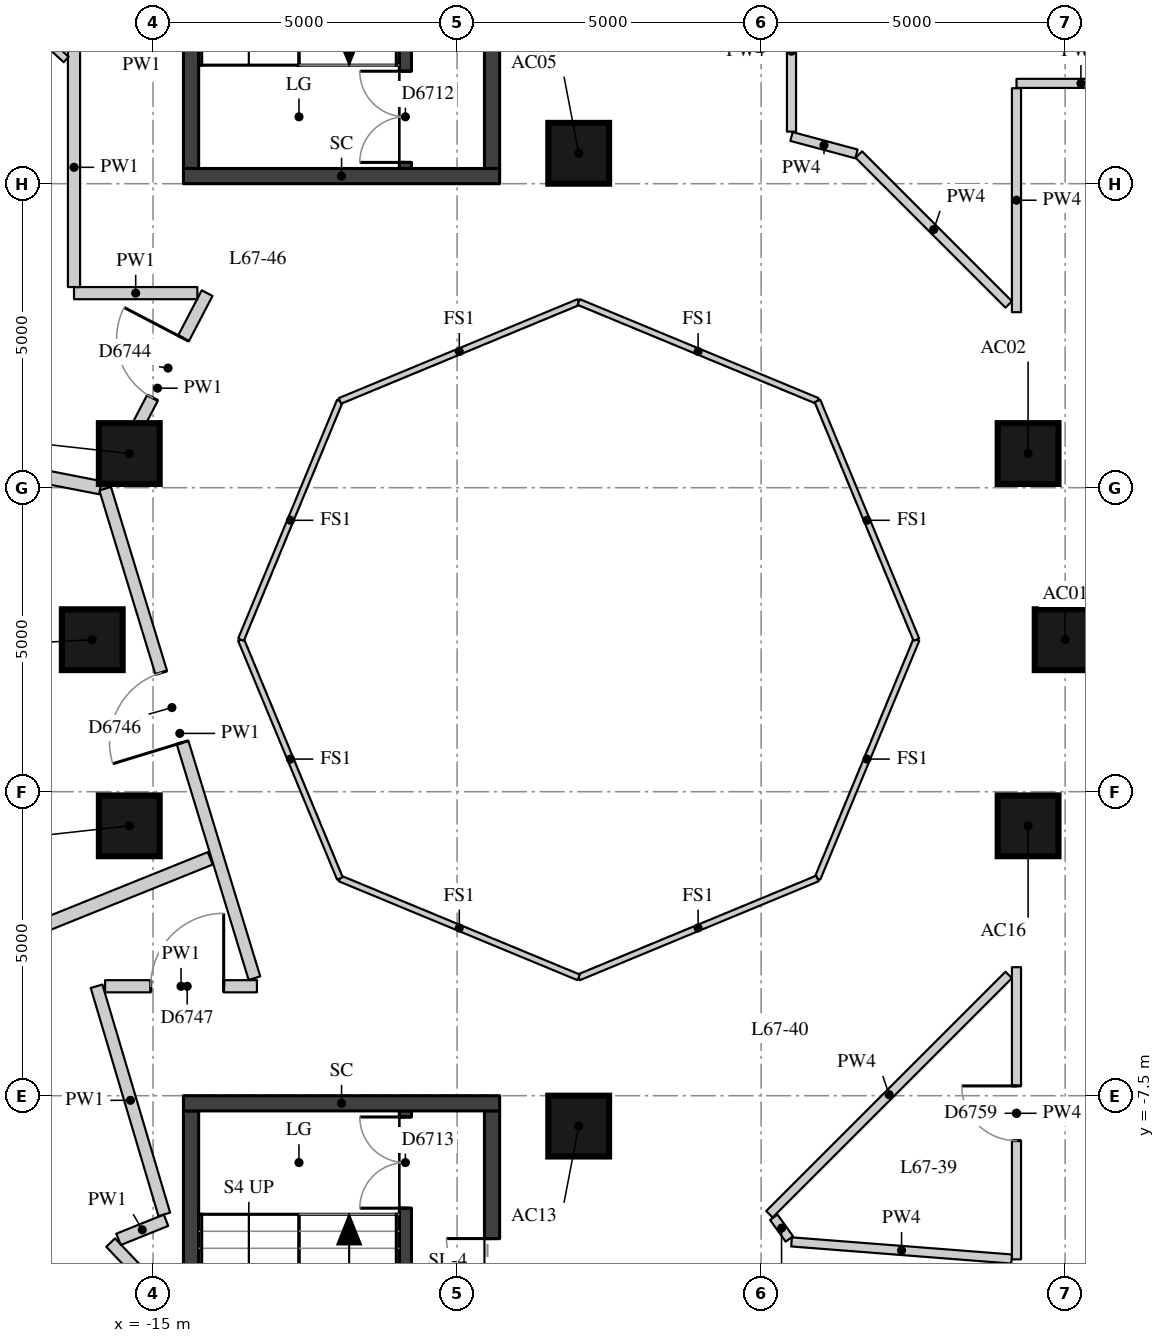
"""IFC4 building model, lengths in metres.
Left out: names, types, materials, properties, quantities, classifications, styles, units other than length and angle.
Written with IfcOpenShell. Run it as: python <this file> out.ifc"""

import sys

from ifc_helpers import new_model, si_unit, direction, frame, frame_2d, origin, origin_2d, place, context, subcontext, project, spatial, rectangle, extrude, element, fill, save


model = new_model("IFC4")
c1 = context("Model", 3, precision=1e-05, world=origin(), true_north=direction((0.0, 1.0)))
c2 = subcontext(c1, "Body", "Model", "MODEL_VIEW")
j1 = project(units=[si_unit("LENGTHUNIT", "METRE"), si_unit("PLANEANGLEUNIT", "RADIAN")], contexts=[c1])
p1 = place(None, origin())
s1 = spatial("IfcSite", under=j1, at=p1, CompositionType="ELEMENT")
p2 = place(p1, origin())
s2 = spatial("IfcBuilding", under=s1, at=p2, CompositionType="ELEMENT")
p3 = place(p2, frame((0.0, 0.0, 236.6)))
s3 = spatial("IfcBuildingStorey", under=s2, at=p3, CompositionType="ELEMENT", Elevation=236.6)
for number, where, z_axis, x_axis in (
    (1, (0.0, 0.0, 0.0), (0.0, 0.0, 1.0), (1.0, 0.0, 0.0)),
    (2, (-0.609, 3.062, 0.0), (0.0, 0.0, 1.0), (1.0, 0.0, 0.0)),
    (3, (-8.0, 8.0, 0.0), (0.0, 0.0, 1.0), (1.0, 0.0, 0.0)),
    (4, (-15.391, 3.062, 0.0), (0.0, 0.0, 1.0), (1.0, 0.0, 0.0)),
    (5, (-16.0, 0.0, 0.0), (0.0, 0.0, 1.0), (1.0, 0.0, 0.0)),
    (6, (-15.391, -3.062, 0.0), (0.0, 0.0, 1.0), (1.0, 0.0, 0.0)),
    (7, (-8.0, -8.0, 0.0), (0.0, 0.0, 1.0), (1.0, 0.0, 0.0)),
    (8, (-0.609, -3.062, 0.0), (0.0, 0.0, 1.0), (1.0, 0.0, 0.0)),
):
    element("IfcColumn", number, at=place(p3, frame(where, z_axis=z_axis, x_axis=x_axis)), inside=s3, PredefinedType="COLUMN", context=c2, shape_type="SweptSolid", body=[
        extrude(rectangle(XDim=1.0, YDim=1.0, at=origin_2d()), origin(), (0.0, 0.0, 1.0), 3.3),
    ])
p4 = place(p3, frame((-10.85, 7.75, 0.0), z_axis=(0.0, 0.0, 1.0), x_axis=(0.0, 1.0, 0.0)))
e9 = element("IfcWall", 9, at=p4, inside=s3, PredefinedType="SHEAR", context=c2, shape_type="SweptSolid", body=[
    extrude(rectangle(XDim=6.0, YDim=0.2, at=frame_2d((3.0, 0.0))), origin(), (0.0, 0.0, 1.0), 3.02),
])
p5 = place(p4, frame((0.1, 0.0, 0.0)))
e10 = element("IfcOpeningElement", 10, at=p5, cuts=e9, PredefinedType="OPENING", context=c2, shape_type="SweptSolid", body=[
    extrude(rectangle(XDim=1.5, YDim=2.1, at=frame_2d((0.75, 1.05))), frame((0.0, 0.11, 0.0), z_axis=(0.0, -1.0, 0.0), x_axis=(1.0, 0.0, 0.0)), (0.0, 0.0, 1.0), 0.22),
])
p6 = place(p3, frame((-10.85, -13.75, 0.0), z_axis=(0.0, 0.0, 1.0), x_axis=(0.0, 1.0, 0.0)))
e11 = element("IfcWall", 11, at=p6, inside=s3, PredefinedType="SHEAR", context=c2, shape_type="SweptSolid", body=[
    extrude(rectangle(XDim=6.0, YDim=0.2, at=frame_2d((3.0, 0.0))), origin(), (0.0, 0.0, 1.0), 3.02),
])
p7 = place(p6, frame((4.4, 0.0, 0.0)))
e12 = element("IfcOpeningElement", 12, at=p7, cuts=e11, PredefinedType="OPENING", context=c2, shape_type="SweptSolid", body=[
    extrude(rectangle(XDim=1.5, YDim=2.1, at=frame_2d((0.75, 1.05))), frame((0.0, 0.11, 0.0), z_axis=(0.0, -1.0, 0.0), x_axis=(1.0, 0.0, 0.0)), (0.0, 0.0, 1.0), 0.22),
])
p8 = place(p3, frame((-14.375, 7.75, -0.28), z_axis=(0.0, 0.0, 1.0), x_axis=(0.0, 1.0, 0.0)))
e13 = element("IfcWall", 13, at=p8, inside=s3, PredefinedType="SHEAR", context=c2, shape_type="SweptSolid", body=[
    extrude(rectangle(XDim=6.0, YDim=0.25, at=frame_2d((3.0, 0.0))), origin(), (0.0, 0.0, 1.0), 3.3),
])
p9 = place(p3, frame((-9.425, 7.75, -0.28), z_axis=(0.0, 0.0, 1.0), x_axis=(0.0, 1.0, 0.0)))
e14 = element("IfcWall", 14, at=p9, inside=s3, PredefinedType="SHEAR", context=c2, shape_type="SweptSolid", body=[
    extrude(rectangle(XDim=6.0, YDim=0.25, at=frame_2d((3.0, 0.0))), origin(), (0.0, 0.0, 1.0), 3.3),
])
p10 = place(p9, frame((2.1, 0.0, 0.28)))
e15 = element("IfcOpeningElement", 15, at=p10, cuts=e14, PredefinedType="OPENING", context=c2, shape_type="SweptSolid", body=[
    extrude(rectangle(XDim=1.5, YDim=2.1, at=frame_2d((0.75, 1.05))), frame((0.0, 0.135, 0.0), z_axis=(0.0, -1.0, 0.0), x_axis=(1.0, 0.0, 0.0)), (0.0, 0.0, 1.0), 0.27),
])
p11 = place(p3, frame((-14.5, 7.625, -0.28), z_axis=(0.0, 0.0, 1.0), x_axis=(1.0, 0.0, 0.0)))
e16 = element("IfcWall", 16, at=p11, inside=s3, PredefinedType="SHEAR", context=c2, shape_type="SweptSolid", body=[
    extrude(rectangle(XDim=5.2, YDim=0.25, at=frame_2d((2.6, 0.0))), origin(), (0.0, 0.0, 1.0), 3.3),
])
p12 = place(p3, frame((-14.375, -13.75, -0.28), z_axis=(0.0, 0.0, 1.0), x_axis=(0.0, 1.0, 0.0)))
e17 = element("IfcWall", 17, at=p12, inside=s3, PredefinedType="SHEAR", context=c2, shape_type="SweptSolid", body=[
    extrude(rectangle(XDim=6.0, YDim=0.25, at=frame_2d((3.0, 0.0))), origin(), (0.0, 0.0, 1.0), 3.3),
])
p13 = place(p3, frame((-9.425, -13.75, -0.28), z_axis=(0.0, 0.0, 1.0), x_axis=(0.0, 1.0, 0.0)))
e18 = element("IfcWall", 18, at=p13, inside=s3, PredefinedType="SHEAR", context=c2, shape_type="SweptSolid", body=[
    extrude(rectangle(XDim=6.0, YDim=0.25, at=frame_2d((3.0, 0.0))), origin(), (0.0, 0.0, 1.0), 3.3),
])
p14 = place(p13, frame((2.4, 0.0, 0.28)))
e19 = element("IfcOpeningElement", 19, at=p14, cuts=e18, PredefinedType="OPENING", context=c2, shape_type="SweptSolid", body=[
    extrude(rectangle(XDim=1.5, YDim=2.1, at=frame_2d((0.75, 1.05))), frame((0.0, 0.135, 0.0), z_axis=(0.0, -1.0, 0.0), x_axis=(1.0, 0.0, 0.0)), (0.0, 0.0, 1.0), 0.27),
])
p15 = place(p3, frame((-14.5, -7.625, -0.28), z_axis=(0.0, 0.0, 1.0), x_axis=(1.0, 0.0, 0.0)))
e20 = element("IfcWall", 20, at=p15, inside=s3, PredefinedType="SHEAR", context=c2, shape_type="SweptSolid", body=[
    extrude(rectangle(XDim=5.2, YDim=0.25, at=frame_2d((2.6, 0.0))), origin(), (0.0, 0.0, 1.0), 3.3),
])
p16 = place(p3, frame((-14.563, -11.111, 0.0), z_axis=(0.0, 0.0, 1.0), x_axis=(-0.688574238414, 0.725165855645, 0.0)))
e21 = element("IfcWall", 21, at=p16, inside=s3, PredefinedType="PARTITIONING", context=c2, shape_type="SweptSolid", body=[
    extrude(rectangle(XDim=1.648, YDim=0.2, at=frame_2d((0.824, 0.0))), origin(), (0.0, 0.0, 1.0), 3.02),
])
p17 = place(p3, frame((-15.568, -9.863, 0.0), z_axis=(0.0, 0.0, 1.0), x_axis=(0.92779485846, 0.373090740457, 0.0)))
e22 = element("IfcWall", 22, at=p17, inside=s3, PredefinedType="PARTITIONING", context=c2, shape_type="SweptSolid", body=[
    extrude(rectangle(XDim=0.842, YDim=0.2, at=frame_2d((0.421, 0.0))), origin(), (0.0, 0.0, 1.0), 3.02),
])
p18 = place(p3, frame((-14.815, -9.452, 0.0), z_axis=(0.0, 0.0, 1.0), x_axis=(-0.284600079658, 0.958646334504, 0.0)))
e23 = element("IfcWall", 23, at=p18, inside=s3, PredefinedType="PARTITIONING", context=c2, shape_type="SweptSolid", body=[
    extrude(rectangle(XDim=3.914, YDim=0.2, at=frame_2d((1.957, 0.0))), origin(), (0.0, 0.0, 1.0), 3.02),
])
p19 = place(p3, frame((-15.789, -5.7, 0.0), z_axis=(0.0, 0.0, 1.0), x_axis=(1.0, 0.0, 0.0)))
e24 = element("IfcWall", 24, at=p19, inside=s3, PredefinedType="PARTITIONING", context=c2, shape_type="SweptSolid", body=[
    extrude(rectangle(XDim=2.497, YDim=0.2, at=frame_2d((1.249, 0.0))), origin(), (0.0, 0.0, 1.0), 3.02),
])
p20 = place(p19, frame((0.75, 0.0, 0.0)))
e25 = element("IfcOpeningElement", 25, at=p20, cuts=e24, PredefinedType="OPENING", context=c2, shape_type="SweptSolid", body=[
    extrude(rectangle(XDim=1.2, YDim=2.1, at=frame_2d((0.6, 1.05))), frame((0.0, 0.11, 0.0), z_axis=(0.0, -1.0, 0.0), x_axis=(1.0, 0.0, 0.0)), (0.0, 0.0, 1.0), 0.22),
])
p21 = place(p3, frame((-13.333, -5.567, 0.0), z_axis=(0.0, 0.0, 1.0), x_axis=(-0.291732883234, 0.956499830026, 0.0)))
e26 = element("IfcWall", 26, at=p21, inside=s3, PredefinedType="PARTITIONING", context=c2, shape_type="SweptSolid", body=[
    extrude(rectangle(XDim=8.417, YDim=0.2, at=frame_2d((4.208, 0.0))), origin(), (0.0, 0.0, 1.0), 3.02),
])
p22 = place(p21, frame((4.053, 0.0, 0.0)))
e27 = element("IfcOpeningElement", 27, at=p22, cuts=e26, PredefinedType="OPENING", context=c2, shape_type="SweptSolid", body=[
    extrude(rectangle(XDim=1.2, YDim=2.1, at=frame_2d((0.6, 1.05))), frame((0.0, 0.11, 0.0), z_axis=(0.0, -1.0, 0.0), x_axis=(1.0, 0.0, 0.0)), (0.0, 0.0, 1.0), 0.22),
])
p23 = place(p3, frame((-15.742, 2.573, 0.0), z_axis=(0.0, 0.0, 1.0), x_axis=(0.462435860297, 0.886652736482, 0.0)))
e28 = element("IfcWall", 28, at=p23, inside=s3, PredefinedType="PARTITIONING", context=c2, shape_type="SweptSolid", body=[
    extrude(rectangle(XDim=3.526, YDim=0.2, at=frame_2d((1.763, 0.0))), origin(), (0.0, 0.0, 1.0), 3.02),
])
p24 = place(p23, frame((1.586, 0.0, 0.0)))
e29 = element("IfcOpeningElement", 29, at=p24, cuts=e28, PredefinedType="OPENING", context=c2, shape_type="SweptSolid", body=[
    extrude(rectangle(XDim=1.1, YDim=2.1, at=frame_2d((0.55, 1.05))), frame((0.0, 0.11, 0.0), z_axis=(0.0, -1.0, 0.0), x_axis=(1.0, 0.0, 0.0)), (0.0, 0.0, 1.0), 0.22),
])
p25 = place(p3, frame((-14.271, 5.7, 0.0), z_axis=(0.0, 0.0, 1.0), x_axis=(-1.0, 0.0, 0.0)))
e30 = element("IfcWall", 30, at=p25, inside=s3, PredefinedType="PARTITIONING", context=c2, shape_type="SweptSolid", body=[
    extrude(rectangle(XDim=2.029, YDim=0.2, at=frame_2d((1.014, 0.0))), origin(), (0.0, 0.0, 1.0), 3.02),
])
p26 = place(p3, frame((-16.3, 5.8, 0.0), z_axis=(0.0, 0.0, 1.0), x_axis=(0.0, 1.0, 0.0)))
e31 = element("IfcWall", 31, at=p26, inside=s3, PredefinedType="PARTITIONING", context=c2, shape_type="SweptSolid", body=[
    extrude(rectangle(XDim=3.939, YDim=0.2, at=frame_2d((1.969, 0.0))), origin(), (0.0, 0.0, 1.0), 3.02),
])
p27 = place(p3, frame((1.32, 9.15, 0.0), z_axis=(0.0, 0.0, 1.0), x_axis=(-1.0, 0.0, 0.0)))
e32 = element("IfcWall", 32, at=p27, inside=s3, PredefinedType="PARTITIONING", context=c2, shape_type="SweptSolid", body=[
    extrude(rectangle(XDim=2.12, YDim=0.15, at=frame_2d((1.06, 0.0))), origin(), (0.0, 0.0, 1.0), 3.02),
])
p28 = place(p3, frame((-0.8, 9.07, 0.0), z_axis=(0.0, 0.0, 1.0), x_axis=(0.0, -1.0, 0.0)))
e33 = element("IfcWall", 33, at=p28, inside=s3, PredefinedType="PARTITIONING", context=c2, shape_type="SweptSolid", body=[
    extrude(rectangle(XDim=3.683, YDim=0.15, at=frame_2d((1.842, 0.0))), origin(), (0.0, 0.0, 1.0), 3.02),
])
p29 = place(p3, frame((-0.927, 5.514, 0.0), z_axis=(0.0, 0.0, 1.0), x_axis=(-0.707106781187, 0.707106781187, 0.0)))
e34 = element("IfcWall", 34, at=p29, inside=s3, PredefinedType="PARTITIONING", context=c2, shape_type="SweptSolid", body=[
    extrude(rectangle(XDim=3.487, YDim=0.15, at=frame_2d((1.743, 0.0))), origin(), (0.0, 0.0, 1.0), 3.02),
])
p30 = place(p3, frame((-3.432, 7.99, 0.0), z_axis=(0.0, 0.0, 1.0), x_axis=(-0.965900750832, 0.258912609855, 0.0)))
e35 = element("IfcWall", 35, at=p30, inside=s3, PredefinedType="PARTITIONING", context=c2, shape_type="SweptSolid", body=[
    extrude(rectangle(XDim=1.106, YDim=0.15, at=frame_2d((0.553, 0.0))), origin(), (0.0, 0.0, 1.0), 3.02),
])
p31 = place(p3, frame((-4.5, 8.356, 0.0), z_axis=(0.0, 0.0, 1.0), x_axis=(0.0, 1.0, 0.0)))
e36 = element("IfcWall", 36, at=p31, inside=s3, PredefinedType="PARTITIONING", context=c2, shape_type="SweptSolid", body=[
    extrude(rectangle(XDim=2.645, YDim=0.15, at=frame_2d((1.323, 0.0))), origin(), (0.0, 0.0, 1.0), 3.02),
])
p32 = place(p3, frame((-0.8, -5.386, 0.0), z_axis=(0.0, 0.0, 1.0), x_axis=(0.0, -1.0, 0.0)))
e37 = element("IfcWall", 37, at=p32, inside=s3, PredefinedType="PARTITIONING", context=c2, shape_type="SweptSolid", body=[
    extrude(rectangle(XDim=4.805, YDim=0.15, at=frame_2d((2.403, 0.0))), origin(), (0.0, 0.0, 1.0), 3.02),
])
p33 = place(p32, frame((1.953, 0.0, 0.0)))
e38 = element("IfcOpeningElement", 38, at=p33, cuts=e37, PredefinedType="OPENING", context=c2, shape_type="SweptSolid", body=[
    extrude(rectangle(XDim=0.9, YDim=2.1, at=frame_2d((0.45, 1.05))), frame((0.0, 0.085, 0.0), z_axis=(0.0, -1.0, 0.0), x_axis=(1.0, 0.0, 0.0)), (0.0, 0.0, 1.0), 0.17),
])
p34 = place(p3, frame((-0.88, -10.186, 0.0), z_axis=(0.0, 0.0, 1.0), x_axis=(-0.996990060313, 0.077529475925, 0.0)))
e39 = element("IfcWall", 39, at=p34, inside=s3, PredefinedType="PARTITIONING", context=c2, shape_type="SweptSolid", body=[
    extrude(rectangle(XDim=3.631, YDim=0.15, at=frame_2d((1.815, 0.0))), origin(), (0.0, 0.0, 1.0), 3.02),
])
p35 = place(p3, frame((-4.535, -9.856, 0.0), z_axis=(0.0, 0.0, 1.0), x_axis=(-0.583807558681, 0.811892070676, 0.0)))
e40 = element("IfcWall", 40, at=p35, inside=s3, PredefinedType="PARTITIONING", context=c2, shape_type="SweptSolid", body=[
    extrude(rectangle(XDim=0.44, YDim=0.15, at=frame_2d((0.22, 0.0))), origin(), (0.0, 0.0, 1.0), 3.02),
])
p36 = place(p3, frame((-4.864, -9.45, 0.0), z_axis=(0.0, 0.0, 1.0), x_axis=(0.707106781187, 0.707106781187, 0.0)))
e41 = element("IfcWall", 41, at=p36, inside=s3, PredefinedType="PARTITIONING", context=c2, shape_type="SweptSolid", body=[
    extrude(rectangle(XDim=5.566, YDim=0.15, at=frame_2d((2.783, 0.0))), origin(), (0.0, 0.0, 1.0), 3.02),
])
p37 = place(p3, frame((-21.724, 3.643, 0.0), z_axis=(0.0, 0.0, 1.0), x_axis=(0.981479525595, -0.191567066159, 0.0)))
e42 = element("IfcWall", 42, at=p37, inside=s3, PredefinedType="PARTITIONING", context=c2, shape_type="SweptSolid", body=[
    extrude(rectangle(XDim=5.968, YDim=0.22, at=frame_2d((2.984, 0.0))), origin(), (0.0, 0.0, 1.0), 2.57),
])
p38 = place(p3, frame((-20.759, -6.295, 0.0), z_axis=(0.0, 0.0, 1.0), x_axis=(0.927536731172, 0.373732006023, 0.0)))
e43 = element("IfcWall", 43, at=p38, inside=s3, PredefinedType="PARTITIONING", context=c2, shape_type="SweptSolid", body=[
    extrude(rectangle(XDim=7.224, YDim=0.22, at=frame_2d((3.612, 0.0))), origin(), (0.0, 0.0, 1.0), 3.02),
])
p39 = place(p3, frame((-16.429, 9.541, 0.0), z_axis=(0.0, 0.0, 1.0), x_axis=(-0.732625124054, 0.680632373315, 0.0)))
e44 = element("IfcWall", 44, at=p39, inside=s3, PredefinedType="PARTITIONING", context=c2, shape_type="SweptSolid", body=[
    extrude(rectangle(XDim=2.066, YDim=0.12, at=frame_2d((1.033, 0.0))), origin(), (0.0, 0.0, 1.0), 3.02),
])
for number, where, z_axis, x_axis in (
    (45, (-2.446, 0.0, 0.0), (0.0, 0.0, 1.0), (-0.383, -0.924, 0.0)),
    (46, (-4.073, -3.927, 0.0), (0.0, 0.0, 1.0), (-0.924, -0.383, 0.0)),
    (47, (-8.0, -5.554, 0.0), (0.0, 0.0, 1.0), (-0.924, 0.383, 0.0)),
    (48, (-11.927, -3.927, 0.0), (0.0, 0.0, 1.0), (-0.383, 0.924, 0.0)),
    (49, (-13.554, 0.0, 0.0), (0.0, 0.0, 1.0), (0.383, 0.924, 0.0)),
    (50, (-11.927, 3.927, 0.0), (0.0, 0.0, 1.0), (0.924, 0.383, 0.0)),
    (51, (-8.0, 5.554, 0.0), (0.0, 0.0, 1.0), (0.924, -0.383, 0.0)),
    (52, (-4.073, 3.927, 0.0), (0.0, 0.0, 1.0), (0.383, -0.924, 0.0)),
):
    element("IfcWall", number, at=place(p3, frame(where, z_axis=z_axis, x_axis=x_axis)), inside=s3, PredefinedType="PARTITIONING", context=c2, shape_type="SweptSolid", body=[
        extrude(rectangle(XDim=4.251, YDim=0.1, at=frame_2d((2.125, 0.0))), origin(), (0.0, 0.0, 1.0), 3.02),
    ])
p40 = place(p5, origin())
e53 = element("IfcDoor", 53, at=p40, inside=s3, OperationType="DOUBLE_DOOR_SINGLE_SWING", PredefinedType="DOOR", context=c2, shape_type="SweptSolid", body=[
    extrude(rectangle(XDim=1.5, YDim=2.1, at=frame_2d((0.75, 1.05))), frame((0.0, 0.025, 0.0), z_axis=(0.0, -1.0, 0.0), x_axis=(1.0, 0.0, 0.0)), (0.0, 0.0, 1.0), 0.05),
])
fill(e10, e53)
p41 = place(p7, origin())
e54 = element("IfcDoor", 54, at=p41, inside=s3, OperationType="DOUBLE_DOOR_SINGLE_SWING", PredefinedType="DOOR", context=c2, shape_type="SweptSolid", body=[
    extrude(rectangle(XDim=1.5, YDim=2.1, at=frame_2d((0.75, 1.05))), frame((0.0, 0.025, 0.0), z_axis=(0.0, -1.0, 0.0), x_axis=(1.0, 0.0, 0.0)), (0.0, 0.0, 1.0), 0.05),
])
fill(e12, e54)
p42 = place(p14, origin())
e55 = element("IfcDoor", 55, at=p42, inside=s3, OperationType="DOUBLE_DOOR_SINGLE_SWING", PredefinedType="DOOR", context=c2, shape_type="SweptSolid", body=[
    extrude(rectangle(XDim=1.5, YDim=2.1, at=frame_2d((0.75, 1.05))), frame((0.0, 0.025, 0.0), z_axis=(0.0, -1.0, 0.0), x_axis=(1.0, 0.0, 0.0)), (0.0, 0.0, 1.0), 0.05),
])
fill(e19, e55)
p43 = place(p24, origin())
e56 = element("IfcDoor", 56, at=p43, inside=s3, OperationType="SINGLE_SWING_RIGHT", PredefinedType="DOOR", context=c2, shape_type="SweptSolid", body=[
    extrude(rectangle(XDim=1.1, YDim=2.1, at=frame_2d((0.55, 1.05))), frame((0.0, 0.025, 0.0), z_axis=(0.0, -1.0, 0.0), x_axis=(1.0, 0.0, 0.0)), (0.0, 0.0, 1.0), 0.05),
])
fill(e29, e56)
p44 = place(p22, origin())
e57 = element("IfcDoor", 57, at=p44, inside=s3, OperationType="SINGLE_SWING_LEFT", PredefinedType="DOOR", context=c2, shape_type="SweptSolid", body=[
    extrude(rectangle(XDim=1.2, YDim=2.1, at=frame_2d((0.6, 1.05))), frame((0.0, 0.025, 0.0), z_axis=(0.0, -1.0, 0.0), x_axis=(1.0, 0.0, 0.0)), (0.0, 0.0, 1.0), 0.05),
])
fill(e27, e57)
p45 = place(p20, origin())
e58 = element("IfcDoor", 58, at=p45, inside=s3, OperationType="SINGLE_SWING_RIGHT", PredefinedType="DOOR", context=c2, shape_type="SweptSolid", body=[
    extrude(rectangle(XDim=1.2, YDim=2.1, at=frame_2d((0.6, 1.05))), frame((0.0, 0.025, 0.0), z_axis=(0.0, -1.0, 0.0), x_axis=(1.0, 0.0, 0.0)), (0.0, 0.0, 1.0), 0.05),
])
fill(e25, e58)
p46 = place(p33, origin())
e59 = element("IfcDoor", 59, at=p46, inside=s3, OperationType="SINGLE_SWING_RIGHT", PredefinedType="DOOR", context=c2, shape_type="SweptSolid", body=[
    extrude(rectangle(XDim=0.9, YDim=2.1, at=frame_2d((0.45, 1.05))), frame((0.0, 0.025, 0.0), z_axis=(0.0, -1.0, 0.0), x_axis=(1.0, 0.0, 0.0)), (0.0, 0.0, 1.0), 0.05),
])
fill(e38, e59)
save(model, sys.argv[1])
